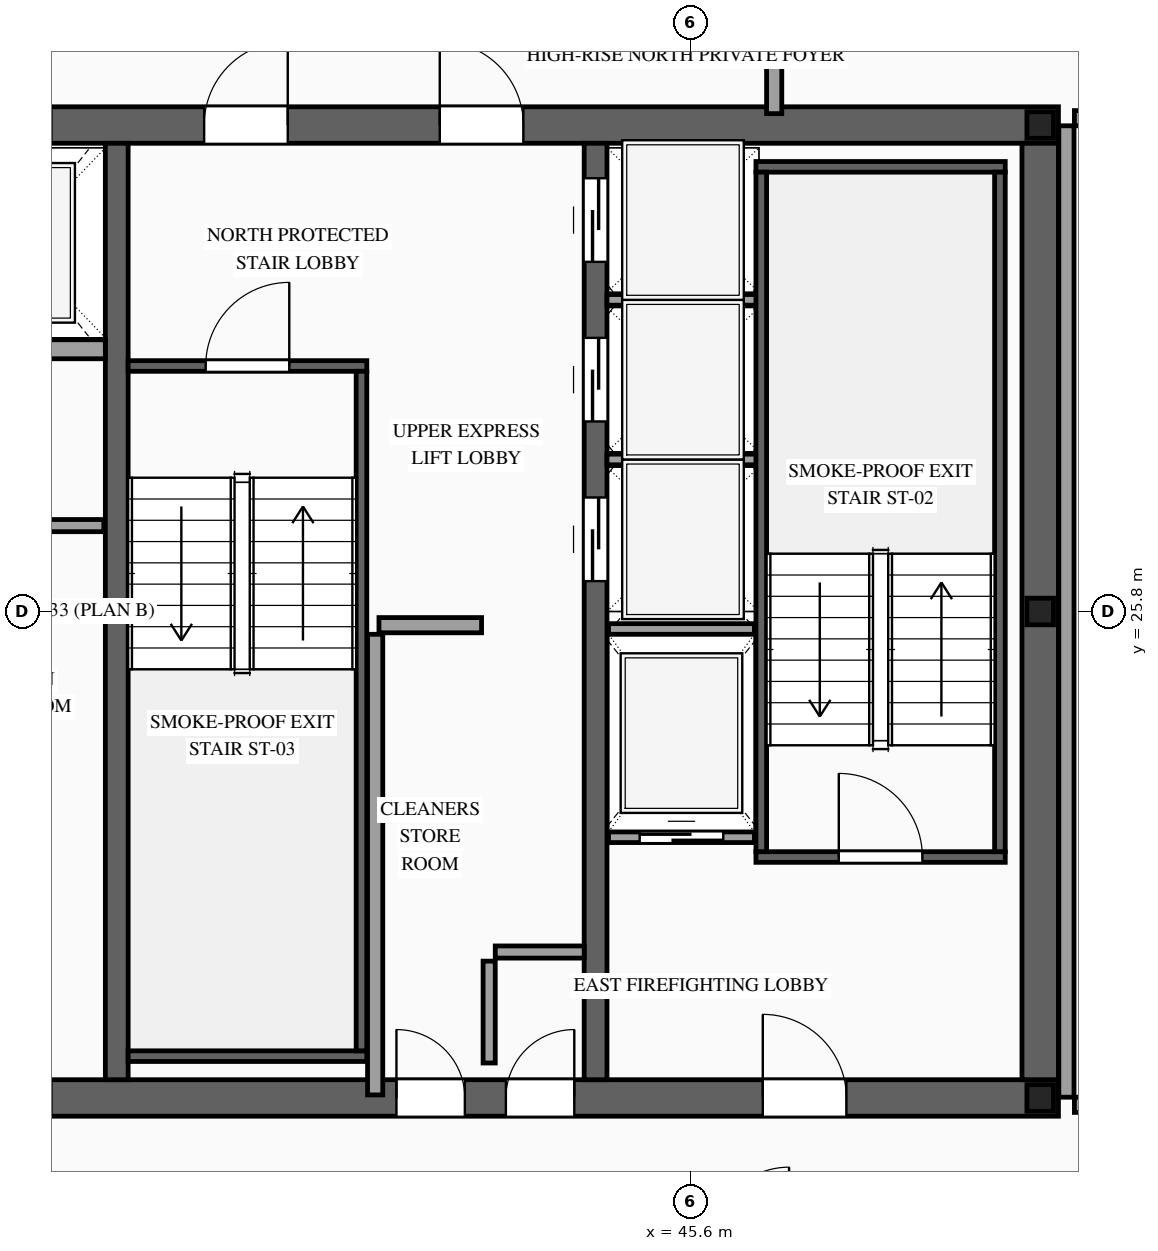
"""IFC4 building model, lengths in metres.
Left out: names, types, materials, properties, quantities, classifications, styles, units other than length and angle.
Written with IfcOpenShell. Run it as: python <this file> out.ifc"""

import sys

from ifc_helpers import new_model, si_unit, direction, frame, frame_2d, origin, origin_2d, place, context, subcontext, project, spatial, rectangle, i_section, extrude, source, transform, mapped, element, fill, save


model = new_model("IFC4")
c1 = context("Model", 3, precision=1e-05, world=origin(), true_north=direction((0.0, 1.0)))
c2 = subcontext(c1, "Body", "Model", "MODEL_VIEW")
j1 = project(units=[si_unit("LENGTHUNIT", "METRE"), si_unit("PLANEANGLEUNIT", "RADIAN")], contexts=[c1])
p1 = place(None, origin())
s1 = spatial("IfcSite", under=j1, at=p1, CompositionType="ELEMENT")
p2 = place(p1, origin())
s2 = spatial("IfcBuilding", under=s1, at=p2, CompositionType="ELEMENT")
p3 = place(p2, frame((0.0, 0.0, 328.7)))
s3 = spatial("IfcBuildingStorey", under=s2, at=p3, CompositionType="ELEMENT", Elevation=328.7)
p4 = place(p3, frame((23.56, 19.4, 0.0), z_axis=(0.0, 0.0, 1.0), x_axis=(1.0, 0.0, 0.0)))
e1 = element("IfcWall", 1, at=p4, inside=s3, PredefinedType="SHEAR", context=c2, shape_type="SweptSolid", body=[
    extrude(rectangle(XDim=26.88, YDim=0.48, at=frame_2d((13.44, 0.0))), origin(), (0.0, 0.0, 1.0), 3.5),
])
p5 = place(p4, frame((1.89, 0.0, 0.0)))
e2 = element("IfcOpeningElement", 2, at=p5, cuts=e1, PredefinedType="OPENING", context=c2, shape_type="SweptSolid", body=[
    extrude(rectangle(XDim=1.1, YDim=2.2, at=frame_2d((0.55, 1.1))), frame((0.0, 0.255, 0.0), z_axis=(0.0, -1.0, 0.0), x_axis=(1.0, 0.0, 0.0)), (0.0, 0.0, 1.0), 0.51),
])
p6 = place(p4, frame((9.79, 0.0, 0.0)))
e3 = element("IfcOpeningElement", 3, at=p6, cuts=e1, PredefinedType="OPENING", context=c2, shape_type="SweptSolid", body=[
    extrude(rectangle(XDim=1.1, YDim=2.2, at=frame_2d((0.55, 1.1))), frame((0.0, 0.255, 0.0), z_axis=(0.0, -1.0, 0.0), x_axis=(1.0, 0.0, 0.0)), (0.0, 0.0, 1.0), 0.51),
])
p7 = place(p4, frame((22.99, 0.0, 0.0)))
e4 = element("IfcOpeningElement", 4, at=p7, cuts=e1, PredefinedType="OPENING", context=c2, shape_type="SweptSolid", body=[
    extrude(rectangle(XDim=1.1, YDim=2.2, at=frame_2d((0.55, 1.1))), frame((0.0, 0.255, 0.0), z_axis=(0.0, -1.0, 0.0), x_axis=(1.0, 0.0, 0.0)), (0.0, 0.0, 1.0), 0.51),
])
p8 = place(p4, frame((19.61, 0.0, 0.0)))
e5 = element("IfcOpeningElement", 5, at=p8, cuts=e1, PredefinedType="OPENING", context=c2, shape_type="SweptSolid", body=[
    extrude(rectangle(XDim=0.9, YDim=2.15, at=frame_2d((0.45, 1.075))), frame((0.0, 0.255, 0.0), z_axis=(0.0, -1.0, 0.0), x_axis=(1.0, 0.0, 0.0)), (0.0, 0.0, 1.0), 0.51),
])
p9 = place(p4, frame((18.17, 0.0, 0.0)))
e6 = element("IfcOpeningElement", 6, at=p9, cuts=e1, PredefinedType="OPENING", context=c2, shape_type="SweptSolid", body=[
    extrude(rectangle(XDim=0.9, YDim=2.15, at=frame_2d((0.45, 1.075))), frame((0.0, 0.255, 0.0), z_axis=(0.0, -1.0, 0.0), x_axis=(1.0, 0.0, 0.0)), (0.0, 0.0, 1.0), 0.51),
])
p10 = place(p3, frame((23.56, 32.2, 0.0), z_axis=(0.0, 0.0, 1.0), x_axis=(1.0, 0.0, 0.0)))
e7 = element("IfcWall", 7, at=p10, inside=s3, PredefinedType="SHEAR", context=c2, shape_type="SweptSolid", body=[
    extrude(rectangle(XDim=26.88, YDim=0.48, at=frame_2d((13.44, 0.0))), origin(), (0.0, 0.0, 1.0), 3.5),
])
p11 = place(p10, frame((4.51, 0.0, 0.0)))
e8 = element("IfcOpeningElement", 8, at=p11, cuts=e7, PredefinedType="OPENING", context=c2, shape_type="SweptSolid", body=[
    extrude(rectangle(XDim=0.9, YDim=2.15, at=frame_2d((0.45, 1.075))), frame((0.0, 0.255, 0.0), z_axis=(0.0, -1.0, 0.0), x_axis=(1.0, 0.0, 0.0)), (0.0, 0.0, 1.0), 0.51),
])
p12 = place(p10, frame((9.79, 0.0, 0.0)))
e9 = element("IfcOpeningElement", 9, at=p12, cuts=e7, PredefinedType="OPENING", context=c2, shape_type="SweptSolid", body=[
    extrude(rectangle(XDim=1.1, YDim=2.2, at=frame_2d((0.55, 1.1))), frame((0.0, 0.255, 0.0), z_axis=(0.0, -1.0, 0.0), x_axis=(1.0, 0.0, 0.0)), (0.0, 0.0, 1.0), 0.51),
])
p13 = place(p10, frame((15.64, 0.0, 0.0)))
e10 = element("IfcOpeningElement", 10, at=p13, cuts=e7, PredefinedType="OPENING", context=c2, shape_type="SweptSolid", body=[
    extrude(rectangle(XDim=1.1, YDim=2.2, at=frame_2d((0.55, 1.1))), frame((0.0, 0.255, 0.0), z_axis=(0.0, -1.0, 0.0), x_axis=(1.0, 0.0, 0.0)), (0.0, 0.0, 1.0), 0.51),
])
p14 = place(p10, frame((18.74, 0.0, 0.0)))
e11 = element("IfcOpeningElement", 11, at=p14, cuts=e7, PredefinedType="OPENING", context=c2, shape_type="SweptSolid", body=[
    extrude(rectangle(XDim=1.1, YDim=2.2, at=frame_2d((0.55, 1.1))), frame((0.0, 0.255, 0.0), z_axis=(0.0, -1.0, 0.0), x_axis=(1.0, 0.0, 0.0)), (0.0, 0.0, 1.0), 0.51),
])
m1 = source(origin(), c2, "Body", "SweptSolid", [
    extrude(rectangle(XDim=12.32, YDim=0.48, at=frame_2d((6.16, 0.0))), origin(), (0.0, 0.0, 1.0), 3.5),
])
p15 = place(p3, frame((50.2, 19.64, 0.0), z_axis=(0.0, 0.0, 1.0), x_axis=(0.0, 1.0, 0.0)))
e12 = element("IfcWall", 12, at=p15, inside=s3, PredefinedType="SHEAR", context=c2, shape_type="MappedRepresentation", body=[
    mapped(m1, transform((0.0, 0.0, 0.0), scale=1.0)),
])
m2 = source(origin(), c2, "Body", "SweptSolid", [
    extrude(rectangle(XDim=12.32, YDim=0.3, at=frame_2d((6.16, 0.0))), origin(), (0.0, 0.0, 1.0), 3.5),
])
p16 = place(p3, frame((38.05, 19.64, 0.0), z_axis=(0.0, 0.0, 1.0), x_axis=(0.0, 1.0, 0.0)))
e13 = element("IfcWall", 13, at=p16, inside=s3, PredefinedType="SOLIDWALL", context=c2, shape_type="MappedRepresentation", body=[
    mapped(m2, transform((0.0, 0.0, 0.0), scale=1.0)),
])
p17 = place(p3, frame((44.35, 19.64, 0.0), z_axis=(0.0, 0.0, 1.0), x_axis=(0.0, 1.0, 0.0)))
e14 = element("IfcWall", 14, at=p17, inside=s3, PredefinedType="SOLIDWALL", context=c2, shape_type="SweptSolid", body=[
    extrude(rectangle(XDim=12.32, YDim=0.3, at=frame_2d((6.16, 0.0))), origin(), (0.0, 0.0, 1.0), 3.5),
])
p18 = place(p17, frame((6.56, 0.0, 0.0)))
e15 = element("IfcOpeningElement", 15, at=p18, cuts=e14, PredefinedType="OPENING", context=c2, shape_type="SweptSolid", body=[
    extrude(rectangle(XDim=1.1, YDim=2.2, at=frame_2d((0.55, 1.1))), frame((0.0, 0.165, 0.0), z_axis=(0.0, -1.0, 0.0), x_axis=(1.0, 0.0, 0.0)), (0.0, 0.0, 1.0), 0.33),
])
p19 = place(p17, frame((8.66, 0.0, 0.0)))
e16 = element("IfcOpeningElement", 16, at=p19, cuts=e14, PredefinedType="OPENING", context=c2, shape_type="SweptSolid", body=[
    extrude(rectangle(XDim=1.1, YDim=2.2, at=frame_2d((0.55, 1.1))), frame((0.0, 0.165, 0.0), z_axis=(0.0, -1.0, 0.0), x_axis=(1.0, 0.0, 0.0)), (0.0, 0.0, 1.0), 0.33),
])
p20 = place(p17, frame((10.76, 0.0, 0.0)))
e17 = element("IfcOpeningElement", 17, at=p20, cuts=e14, PredefinedType="OPENING", context=c2, shape_type="SweptSolid", body=[
    extrude(rectangle(XDim=1.1, YDim=2.2, at=frame_2d((0.55, 1.1))), frame((0.0, 0.165, 0.0), z_axis=(0.0, -1.0, 0.0), x_axis=(1.0, 0.0, 0.0)), (0.0, 0.0, 1.0), 0.33),
])
m3 = source(origin(), c2, "Body", "SweptSolid", [
    extrude(i_section(OverallWidth=0.35, OverallDepth=0.35, WebThickness=0.012, FlangeThickness=0.019, at=origin_2d()), origin(), (0.0, 0.0, 1.0), 3.5),
])
for number, where, z_axis, x_axis in (
    (18, (50.2, 19.4, 0.0), (0.0, 0.0, 1.0), (1.0, 0.0, 0.0)),
    (19, (50.2, 25.8, 0.0), (0.0, 0.0, 1.0), (1.0, 0.0, 0.0)),
    (20, (50.2, 32.2, 0.0), (0.0, 0.0, 1.0), (1.0, 0.0, 0.0)),
):
    element("IfcColumn", number, at=place(p3, frame(where, z_axis=z_axis, x_axis=x_axis)), inside=s3, PredefinedType="COLUMN", context=c2, shape_type="MappedRepresentation", body=[
        mapped(m3, transform((0.0, 0.0, 0.0), scale=1.0)),
    ])
p21 = place(p3, frame((44.52, 22.83, 0.0), z_axis=(0.0, 0.0, 1.0), x_axis=(1.0, 0.0, 0.0)))
e21 = element("IfcWall", 21, at=p21, inside=s3, PredefinedType="SOLIDWALL", context=c2, shape_type="SweptSolid", body=[
    extrude(rectangle(XDim=1.92, YDim=0.14, at=frame_2d((0.96, 0.0))), origin(), (0.0, 0.0, 1.0), 3.28),
])
p22 = place(p21, frame((0.41, 0.0, 0.0)))
e22 = element("IfcOpeningElement", 22, at=p22, cuts=e21, PredefinedType="OPENING", context=c2, shape_type="SweptSolid", body=[
    extrude(rectangle(XDim=1.1, YDim=2.2, at=frame_2d((0.55, 1.1))), frame((0.0, 0.085, 0.0), z_axis=(0.0, -1.0, 0.0), x_axis=(1.0, 0.0, 0.0)), (0.0, 0.0, 1.0), 0.17),
])
m4 = source(origin(), c2, "Body", "SweptSolid", [
    extrude(rectangle(XDim=1.92, YDim=0.14, at=frame_2d((0.96, 0.0))), origin(), (0.0, 0.0, 1.0), 3.28),
])
p23 = place(p3, frame((44.52, 25.57, 0.0), z_axis=(0.0, 0.0, 1.0), x_axis=(1.0, 0.0, 0.0)))
e23 = element("IfcWall", 23, at=p23, inside=s3, PredefinedType="SOLIDWALL", context=c2, shape_type="MappedRepresentation", body=[
    mapped(m4, transform((0.0, 0.0, 0.0), scale=1.0)),
])
m5 = source(origin(), c2, "Body", "SweptSolid", [
    extrude(rectangle(XDim=2.4, YDim=0.25, at=frame_2d((1.2, 0.0))), origin(), (0.0, 0.0, 1.0), 3.28),
])
p24 = place(p3, frame((35.5, 29.25, 0.0), z_axis=(0.0, 0.0, 1.0), x_axis=(1.0, 0.0, 0.0)))
e24 = element("IfcWall", 24, at=p24, inside=s3, PredefinedType="SOLIDWALL", context=c2, shape_type="MappedRepresentation", body=[
    mapped(m5, transform((0.0, 0.0, 0.0), scale=1.0)),
])
m6 = source(origin(), c2, "Body", "SweptSolid", [
    extrude(rectangle(XDim=2.0, YDim=0.14, at=frame_2d((1.0, 0.0))), origin(), (0.0, 0.0, 1.0), 3.28),
])
for number, where, z_axis, x_axis in (
    (25, (44.5, 27.8, 0.0), (0.0, 0.0, 1.0), (1.0, 0.0, 0.0)),
    (26, (44.5, 29.9, 0.0), (0.0, 0.0, 1.0), (1.0, 0.0, 0.0)),
):
    element("IfcWall", number, at=place(p3, frame(where, z_axis=z_axis, x_axis=x_axis)), inside=s3, PredefinedType="SOLIDWALL", context=c2, shape_type="MappedRepresentation", body=[
        mapped(m6, transform((0.0, 0.0, 0.0), scale=1.0)),
    ])
p25 = place(p3, frame((46.46, 22.57, 0.0), z_axis=(0.0, 0.0, 1.0), x_axis=(1.0, 0.0, 0.0)))
e27 = element("IfcWall", 27, at=p25, inside=s3, PredefinedType="SOLIDWALL", context=c2, shape_type="SweptSolid", body=[
    extrude(rectangle(XDim=3.28, YDim=0.14, at=frame_2d((1.64, 0.0))), origin(), (0.0, 0.0, 1.0), 3.28),
])
p26 = place(p25, frame((1.09, 0.0, 0.0)))
e28 = element("IfcOpeningElement", 28, at=p26, cuts=e27, PredefinedType="OPENING", context=c2, shape_type="SweptSolid", body=[
    extrude(rectangle(XDim=1.1, YDim=2.2, at=frame_2d((0.55, 1.1))), frame((0.0, 0.085, 0.0), z_axis=(0.0, -1.0, 0.0), x_axis=(1.0, 0.0, 0.0)), (0.0, 0.0, 1.0), 0.17),
])
m7 = source(origin(), c2, "Body", "SweptSolid", [
    extrude(rectangle(XDim=3.28, YDim=0.14, at=frame_2d((1.64, 0.0))), origin(), (0.0, 0.0, 1.0), 3.28),
])
p27 = place(p3, frame((46.46, 31.65, 0.0), z_axis=(0.0, 0.0, 1.0), x_axis=(1.0, 0.0, 0.0)))
e29 = element("IfcWall", 29, at=p27, inside=s3, PredefinedType="SOLIDWALL", context=c2, shape_type="MappedRepresentation", body=[
    mapped(m7, transform((0.0, 0.0, 0.0), scale=1.0)),
])
m8 = source(origin(), c2, "Body", "SweptSolid", [
    extrude(rectangle(XDim=8.94, YDim=0.14, at=frame_2d((4.47, 0.0))), origin(), (0.0, 0.0, 1.0), 3.28),
])
for number, where, z_axis, x_axis in (
    (30, (46.53, 22.64, 0.0), (0.0, 0.0, 1.0), (0.0, 1.0, 0.0)),
    (31, (49.67, 22.64, 0.0), (0.0, 0.0, 1.0), (0.0, 1.0, 0.0)),
):
    element("IfcWall", number, at=place(p3, frame(where, z_axis=z_axis, x_axis=x_axis)), inside=s3, PredefinedType="SOLIDWALL", context=c2, shape_type="MappedRepresentation", body=[
        mapped(m8, transform((0.0, 0.0, 0.0), scale=1.0)),
    ])
p28 = place(p3, frame((38.2, 29.03, 0.0), z_axis=(0.0, 0.0, 1.0), x_axis=(1.0, 0.0, 0.0)))
e32 = element("IfcWall", 32, at=p28, inside=s3, PredefinedType="SOLIDWALL", context=c2, shape_type="SweptSolid", body=[
    extrude(rectangle(XDim=3.14, YDim=0.14, at=frame_2d((1.57, 0.0))), origin(), (0.0, 0.0, 1.0), 3.28),
])
p29 = place(p28, frame((1.02, 0.0, 0.0)))
e33 = element("IfcOpeningElement", 33, at=p29, cuts=e32, PredefinedType="OPENING", context=c2, shape_type="SweptSolid", body=[
    extrude(rectangle(XDim=1.1, YDim=2.2, at=frame_2d((0.55, 1.1))), frame((0.0, 0.085, 0.0), z_axis=(0.0, -1.0, 0.0), x_axis=(1.0, 0.0, 0.0)), (0.0, 0.0, 1.0), 0.17),
])
m9 = source(origin(), c2, "Body", "SweptSolid", [
    extrude(rectangle(XDim=3.14, YDim=0.14, at=frame_2d((1.57, 0.0))), origin(), (0.0, 0.0, 1.0), 3.28),
])
p30 = place(p3, frame((38.2, 19.95, 0.0), z_axis=(0.0, 0.0, 1.0), x_axis=(1.0, 0.0, 0.0)))
e34 = element("IfcWall", 34, at=p30, inside=s3, PredefinedType="SOLIDWALL", context=c2, shape_type="MappedRepresentation", body=[
    mapped(m9, transform((0.0, 0.0, 0.0), scale=1.0)),
])
m10 = source(origin(), c2, "Body", "SweptSolid", [
    extrude(rectangle(XDim=8.94, YDim=0.14, at=frame_2d((4.47, 0.0))), origin(), (0.0, 0.0, 1.0), 3.28),
])
p31 = place(p3, frame((41.27, 20.02, 0.0), z_axis=(0.0, 0.0, 1.0), x_axis=(0.0, 1.0, 0.0)))
e35 = element("IfcWall", 35, at=p31, inside=s3, PredefinedType="SOLIDWALL", context=c2, shape_type="MappedRepresentation", body=[
    mapped(m10, transform((0.0, 0.0, 0.0), scale=1.0)),
])
m11 = source(origin(), c2, "Body", "SweptSolid", [
    extrude(rectangle(XDim=2.36, YDim=0.16, at=frame_2d((1.18, 0.0))), origin(), (0.0, 0.0, 1.0), 3.28),
])
p32 = place(p3, frame((35.52, 26.93, 0.0), z_axis=(0.0, 0.0, 1.0), x_axis=(1.0, 0.0, 0.0)))
e36 = element("IfcWall", 36, at=p32, inside=s3, PredefinedType="PARTITIONING", context=c2, shape_type="MappedRepresentation", body=[
    mapped(m11, transform((0.0, 0.0, 0.0), scale=1.0)),
])
m12 = source(origin(), c2, "Body", "SweptSolid", [
    extrude(rectangle(XDim=1.34, YDim=0.16, at=frame_2d((0.67, 0.0))), origin(), (0.0, 0.0, 1.0), 3.28),
])
p33 = place(p3, frame((42.95, 19.86, 0.0), z_axis=(0.0, 0.0, 1.0), x_axis=(0.0, 1.0, 0.0)))
e37 = element("IfcWall", 37, at=p33, inside=s3, PredefinedType="PARTITIONING", context=c2, shape_type="MappedRepresentation", body=[
    mapped(m12, transform((0.0, 0.0, 0.0), scale=1.0)),
])
m13 = source(origin(), c2, "Body", "SweptSolid", [
    extrude(rectangle(XDim=1.17, YDim=0.16, at=frame_2d((0.585, 0.0))), origin(), (0.0, 0.0, 1.0), 3.28),
])
p34 = place(p3, frame((43.03, 21.32, 0.0), z_axis=(0.0, 0.0, 1.0), x_axis=(1.0, 0.0, 0.0)))
e38 = element("IfcWall", 38, at=p34, inside=s3, PredefinedType="PARTITIONING", context=c2, shape_type="MappedRepresentation", body=[
    mapped(m13, transform((0.0, 0.0, 0.0), scale=1.0)),
])
m14 = source(origin(), c2, "Body", "SweptSolid", [
    extrude(rectangle(XDim=6.06, YDim=0.2, at=frame_2d((3.03, 0.0))), origin(), (0.0, 0.0, 1.0), 3.28),
])
p35 = place(p3, frame((41.45, 19.44, 0.0), z_axis=(0.0, 0.0, 1.0), x_axis=(0.0, 1.0, 0.0)))
e39 = element("IfcWall", 39, at=p35, inside=s3, PredefinedType="PARTITIONING", context=c2, shape_type="MappedRepresentation", body=[
    mapped(m14, transform((0.0, 0.0, 0.0), scale=1.0)),
])
m15 = source(origin(), c2, "Body", "SweptSolid", [
    extrude(rectangle(XDim=1.35, YDim=0.2, at=frame_2d((0.675, 0.0))), origin(), (0.0, 0.0, 1.0), 3.28),
])
p36 = place(p3, frame((41.5, 25.62, 0.0), z_axis=(0.0, 0.0, 1.0), x_axis=(1.0, 0.0, 0.0)))
e40 = element("IfcWall", 40, at=p36, inside=s3, PredefinedType="PARTITIONING", context=c2, shape_type="MappedRepresentation", body=[
    mapped(m15, transform((0.0, 0.0, 0.0), scale=1.0)),
])
m16 = source(origin(), c2, "Body", "SweptSolid", [
    extrude(rectangle(XDim=1.7, YDim=0.2, at=frame_2d((0.85, 0.0))), origin(), (0.0, 0.0, 1.0), 3.28),
])
p37 = place(p3, frame((46.7, 32.35, 0.0), z_axis=(0.0, 0.0, 1.0), x_axis=(0.0, 1.0, 0.0)))
e41 = element("IfcWall", 41, at=p37, inside=s3, PredefinedType="PARTITIONING", context=c2, shape_type="MappedRepresentation", body=[
    mapped(m16, transform((0.0, 0.0, 0.0), scale=1.0)),
])
p38 = place(p3, frame((50.65, 19.31, 0.0), z_axis=(0.0, 0.0, 1.0), x_axis=(1.0, 0.0, 0.0)))
e42 = element("IfcWall", 42, at=p38, inside=s3, PredefinedType="PARTITIONING", context=c2, shape_type="SweptSolid", body=[
    extrude(rectangle(XDim=5.3, YDim=0.2, at=frame_2d((2.65, 0.0))), origin(), (0.0, 0.0, 1.0), 2.825),
])
p39 = place(p38, frame((0.4, 0.0, 0.0)))
e43 = element("IfcOpeningElement", 43, at=p39, cuts=e42, PredefinedType="OPENING", context=c2, shape_type="SweptSolid", body=[
    extrude(rectangle(XDim=1.0, YDim=2.2, at=frame_2d((0.5, 1.1))), frame((0.0, 0.115, 0.0), z_axis=(0.0, -1.0, 0.0), x_axis=(1.0, 0.0, 0.0)), (0.0, 0.0, 1.0), 0.23),
])
m17 = source(origin(), c2, "Body", "SweptSolid", [
    extrude(rectangle(XDim=5.3, YDim=0.2, at=frame_2d((2.65, 0.0))), origin(), (0.0, 0.0, 1.0), 2.825),
])
p40 = place(p3, frame((50.65, 32.29, 0.0), z_axis=(0.0, 0.0, 1.0), x_axis=(1.0, 0.0, 0.0)))
e44 = element("IfcWall", 44, at=p40, inside=s3, PredefinedType="PARTITIONING", context=c2, shape_type="MappedRepresentation", body=[
    mapped(m17, transform((0.0, 0.0, 0.0), scale=1.0)),
])
m18 = source(origin(), c2, "Body", "SweptSolid", [
    extrude(rectangle(XDim=12.78, YDim=0.2, at=frame_2d((6.39, 0.0))), origin(), (0.0, 0.0, 1.0), 3.28),
])
p41 = place(p3, frame((50.545, 19.41, 0.0), z_axis=(0.0, 0.0, 1.0), x_axis=(0.0, 1.0, 0.0)))
e45 = element("IfcWall", 45, at=p41, inside=s3, PredefinedType="PARTITIONING", context=c2, shape_type="MappedRepresentation", body=[
    mapped(m18, transform((0.0, 0.0, 0.0), scale=1.0)),
])
m19 = source(origin(), c2, "Body", "SweptSolid", [
    extrude(rectangle(XDim=1.1, YDim=2.2, at=frame_2d((0.55, 1.1))), frame((0.0, 0.025, 0.0), z_axis=(0.0, -1.0, 0.0), x_axis=(1.0, 0.0, 0.0)), (0.0, 0.0, 1.0), 0.05),
])
p42 = place(p22, origin())
e46 = element("IfcDoor", 46, at=p42, inside=s3, OperationType="SLIDING_TO_RIGHT", PredefinedType="DOOR", context=c2, shape_type="MappedRepresentation", body=[
    mapped(m19, transform((0.0, 0.0, 0.0), scale=1.0)),
])
fill(e22, e46)
p43 = place(p18, origin())
e47 = element("IfcDoor", 47, at=p43, inside=s3, OperationType="SLIDING_TO_LEFT", PredefinedType="DOOR", context=c2, shape_type="MappedRepresentation", body=[
    mapped(m19, transform((0.0, 0.0, 0.0), scale=1.0)),
])
fill(e15, e47)
p44 = place(p19, origin())
e48 = element("IfcDoor", 48, at=p44, inside=s3, OperationType="SLIDING_TO_RIGHT", PredefinedType="DOOR", context=c2, shape_type="MappedRepresentation", body=[
    mapped(m19, transform((0.0, 0.0, 0.0), scale=1.0)),
])
fill(e16, e48)
p45 = place(p20, origin())
e49 = element("IfcDoor", 49, at=p45, inside=s3, OperationType="SLIDING_TO_LEFT", PredefinedType="DOOR", context=c2, shape_type="MappedRepresentation", body=[
    mapped(m19, transform((0.0, 0.0, 0.0), scale=1.0)),
])
fill(e17, e49)
m20 = source(origin(), c2, "Body", "SweptSolid", [
    extrude(rectangle(XDim=1.1, YDim=2.2, at=frame_2d((0.55, 1.1))), frame((0.0, 0.025, 0.0), z_axis=(0.0, -1.0, 0.0), x_axis=(1.0, 0.0, 0.0)), (0.0, 0.0, 1.0), 0.05),
])
p46 = place(p26, origin())
e50 = element("IfcDoor", 50, at=p46, inside=s3, OperationType="SINGLE_SWING_LEFT", PredefinedType="DOOR", context=c2, shape_type="MappedRepresentation", body=[
    mapped(m20, transform((0.0, 0.0, 0.0), scale=1.0)),
])
fill(e28, e50)
p47 = place(p29, origin())
e51 = element("IfcDoor", 51, at=p47, inside=s3, OperationType="SINGLE_SWING_RIGHT", PredefinedType="DOOR", context=c2, shape_type="MappedRepresentation", body=[
    mapped(m20, transform((0.0, 0.0, 0.0), scale=1.0)),
])
fill(e33, e51)
p48 = place(p7, origin())
e52 = element("IfcDoor", 52, at=p48, inside=s3, OperationType="SINGLE_SWING_LEFT", PredefinedType="DOOR", context=c2, shape_type="MappedRepresentation", body=[
    mapped(m20, transform((0.0, 0.0, 0.0), scale=1.0)),
])
fill(e4, e52)
p49 = place(p13, origin())
e53 = element("IfcDoor", 53, at=p49, inside=s3, OperationType="SINGLE_SWING_RIGHT", PredefinedType="DOOR", context=c2, shape_type="MappedRepresentation", body=[
    mapped(m20, transform((0.0, 0.0, 0.0), scale=1.0)),
])
fill(e10, e53)
p50 = place(p14, origin())
e54 = element("IfcDoor", 54, at=p50, inside=s3, OperationType="SINGLE_SWING_LEFT", PredefinedType="DOOR", context=c2, shape_type="MappedRepresentation", body=[
    mapped(m20, transform((0.0, 0.0, 0.0), scale=1.0)),
])
fill(e11, e54)
m21 = source(origin(), c2, "Body", "SweptSolid", [
    extrude(rectangle(XDim=0.9, YDim=2.15, at=frame_2d((0.45, 1.075))), frame((0.0, 0.025, 0.0), z_axis=(0.0, -1.0, 0.0), x_axis=(1.0, 0.0, 0.0)), (0.0, 0.0, 1.0), 0.05),
])
p51 = place(p8, origin())
e55 = element("IfcDoor", 55, at=p51, inside=s3, OperationType="SINGLE_SWING_RIGHT", PredefinedType="DOOR", context=c2, shape_type="MappedRepresentation", body=[
    mapped(m21, transform((0.0, 0.0, 0.0), scale=1.0)),
])
fill(e5, e55)
p52 = place(p9, origin())
e56 = element("IfcDoor", 56, at=p52, inside=s3, OperationType="SINGLE_SWING_LEFT", PredefinedType="DOOR", context=c2, shape_type="MappedRepresentation", body=[
    mapped(m21, transform((0.0, 0.0, 0.0), scale=1.0)),
])
fill(e6, e56)
save(model, sys.argv[1])
